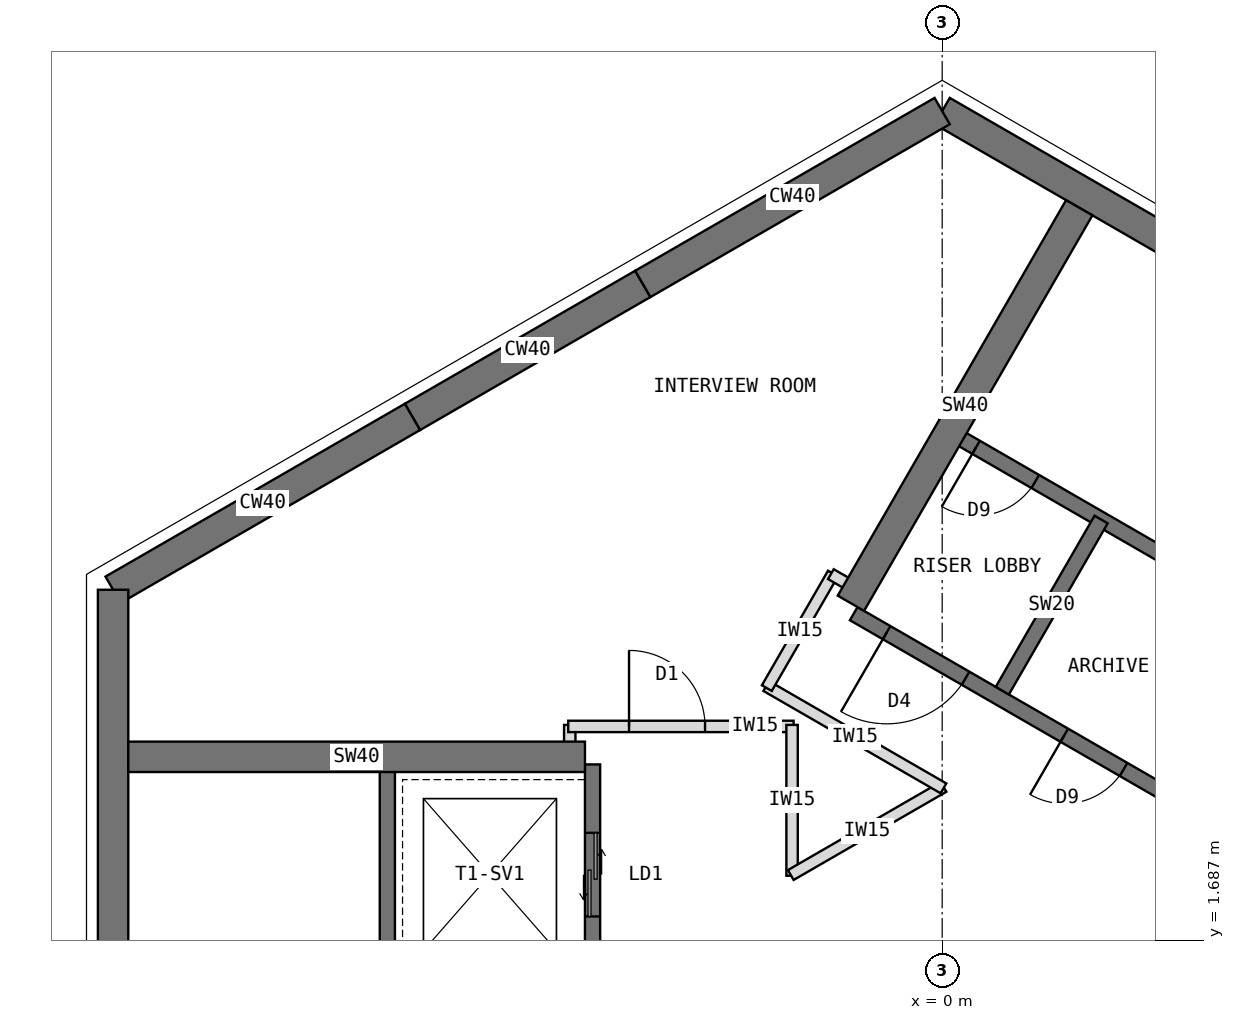
"""IFC4 building model, lengths in metres.
Left out: names, types, materials, properties, quantities, classifications, styles, units other than length and angle.
Written with IfcOpenShell. Run it as: python <this file> out.ifc"""

import sys

from ifc_helpers import new_model, si_unit, direction, frame, frame_2d, origin, place, context, subcontext, project, spatial, rectangle, extrude, element, fill, save


model = new_model("IFC4")
c1 = context("Model", 3, precision=1e-05, world=origin(), true_north=direction((0.0, 1.0)))
c2 = subcontext(c1, "Body", "Model", "MODEL_VIEW")
j1 = project(units=[si_unit("LENGTHUNIT", "METRE"), si_unit("PLANEANGLEUNIT", "RADIAN")], contexts=[c1])
p1 = place(None, origin())
s1 = spatial("IfcSite", under=j1, at=p1, CompositionType="ELEMENT")
p2 = place(p1, origin())
s2 = spatial("IfcBuilding", under=s1, at=p2, CompositionType="ELEMENT")
p3 = place(p2, frame((0.0, 0.0, 287.5)))
s3 = spatial("IfcBuildingStorey", under=s2, at=p3, CompositionType="ELEMENT", Elevation=287.5)
p4 = place(p3, frame((10.908, 6.298, 0.0), z_axis=(0.0, 0.0, 1.0), x_axis=(-0.866021940709, 0.500005998175, 0.0)))
e1 = element("IfcWall", 1, at=p4, inside=s3, PredefinedType="SHEAR", context=c2, shape_type="SweptSolid", body=[
    extrude(rectangle(XDim=12.596, YDim=0.4, at=frame_2d((6.298, 0.0))), origin(), (0.0, 0.0, 1.0), 4.0),
])
p5 = place(p3, frame((0.0, 12.596, 0.0), z_axis=(0.0, 0.0, 1.0), x_axis=(-0.866011268655, -0.500024481964, 0.0)))
e2 = element("IfcWall", 2, at=p5, inside=s3, PredefinedType="SHEAR", context=c2, shape_type="SweptSolid", body=[
    extrude(rectangle(XDim=4.548, YDim=0.4, at=frame_2d((2.274, 0.0))), origin(), (0.0, 0.0, 1.0), 4.0),
])
p6 = place(p3, frame((-3.939, 10.322, 0.0), z_axis=(0.0, 0.0, 1.0), x_axis=(-0.866019471182, -0.500010275428, 0.0)))
e3 = element("IfcWall", 3, at=p6, inside=s3, PredefinedType="SHEAR", context=c2, shape_type="SweptSolid", body=[
    extrude(rectangle(XDim=3.5, YDim=0.4, at=frame_2d((1.75, 0.0))), origin(), (0.0, 0.0, 1.0), 4.0),
])
p7 = place(p3, frame((-6.97, 8.572, 0.0), z_axis=(0.0, 0.0, 1.0), x_axis=(-0.866034513004, -0.499984222037, 0.0)))
e4 = element("IfcWall", 4, at=p7, inside=s3, PredefinedType="SHEAR", context=c2, shape_type="SweptSolid", body=[
    extrude(rectangle(XDim=4.548, YDim=0.4, at=frame_2d((2.274, 0.0))), origin(), (0.0, 0.0, 1.0), 4.0),
])
p8 = place(p3, frame((-10.908, 6.298, 0.0), z_axis=(0.0, 0.0, 1.0), x_axis=(0.0, -1.0, 0.0)))
e5 = element("IfcWall", 5, at=p8, inside=s3, PredefinedType="SHEAR", context=c2, shape_type="SweptSolid", body=[
    extrude(rectangle(XDim=12.596, YDim=0.4, at=frame_2d((6.298, 0.0))), origin(), (0.0, 0.0, 1.0), 4.0),
])
p9 = place(p3, frame((5.764, 1.984, 0.0), z_axis=(0.0, 0.0, 1.0), x_axis=(-0.866026010844, 0.49999894854, 0.0)))
e6 = element("IfcWall", 6, at=p9, inside=s3, PredefinedType="SHEAR", context=c2, shape_type="SweptSolid", body=[
    extrude(rectangle(XDim=8.0, YDim=0.2, at=frame_2d((4.0, 0.0))), origin(), (0.0, 0.0, 1.0), 4.0),
])
p10 = place(p9, frame((6.3, 0.0, 0.0)))
e7 = element("IfcOpeningElement", 7, at=p10, cuts=e6, PredefinedType="OPENING", context=c2, shape_type="SweptSolid", body=[
    extrude(rectangle(XDim=1.2, YDim=2.1, at=frame_2d((0.6, 1.05))), frame((0.0, 0.11, 0.0), z_axis=(0.0, -1.0, 0.0), x_axis=(1.0, 0.0, 0.0)), (0.0, 0.0, 1.0), 0.22),
])
p11 = place(p9, frame((1.0, 0.0, 0.0)))
e8 = element("IfcOpeningElement", 8, at=p11, cuts=e6, PredefinedType="OPENING", context=c2, shape_type="SweptSolid", body=[
    extrude(rectangle(XDim=0.9, YDim=2.1, at=frame_2d((0.45, 1.05))), frame((0.0, 0.11, 0.0), z_axis=(0.0, -1.0, 0.0), x_axis=(1.0, 0.0, 0.0)), (0.0, 0.0, 1.0), 0.22),
])
p12 = place(p9, frame((3.9, 0.0, 0.0)))
e9 = element("IfcOpeningElement", 9, at=p12, cuts=e6, PredefinedType="OPENING", context=c2, shape_type="SweptSolid", body=[
    extrude(rectangle(XDim=0.9, YDim=2.1, at=frame_2d((0.45, 1.05))), frame((0.0, 0.11, 0.0), z_axis=(0.0, -1.0, 0.0), x_axis=(1.0, 0.0, 0.0)), (0.0, 0.0, 1.0), 0.22),
])
p13 = place(p3, frame((0.791, 4.97, 0.0), z_axis=(0.0, 0.0, 1.0), x_axis=(0.499936506574, 0.866062058628, 0.0)))
e10 = element("IfcWall", 10, at=p13, inside=s3, PredefinedType="SHEAR", context=c2, shape_type="SweptSolid", body=[
    extrude(rectangle(XDim=2.6, YDim=0.2, at=frame_2d((1.3, 0.0))), origin(), (0.0, 0.0, 1.0), 4.0),
])
p14 = place(p3, frame((7.114, 4.322, 0.0), z_axis=(0.0, 0.0, 1.0), x_axis=(-0.866026010844, 0.49999894854, 0.0)))
e11 = element("IfcWall", 11, at=p14, inside=s3, PredefinedType="SHEAR", context=c2, shape_type="SweptSolid", body=[
    extrude(rectangle(XDim=8.0, YDim=0.2, at=frame_2d((4.0, 0.0))), origin(), (0.0, 0.0, 1.0), 4.0),
])
p15 = place(p14, frame((6.8, 0.0, 0.0)))
e12 = element("IfcOpeningElement", 12, at=p15, cuts=e11, PredefinedType="OPENING", context=c2, shape_type="SweptSolid", body=[
    extrude(rectangle(XDim=0.9, YDim=2.1, at=frame_2d((0.45, 1.05))), frame((0.0, 0.11, 0.0), z_axis=(0.0, -1.0, 0.0), x_axis=(1.0, 0.0, 0.0)), (0.0, 0.0, 1.0), 0.22),
])
p16 = place(p3, frame((-1.201, 6.12, 0.0), z_axis=(0.0, 0.0, 1.0), x_axis=(0.499997979876, 0.866026570101, 0.0)))
e13 = element("IfcWall", 13, at=p16, inside=s3, PredefinedType="SHEAR", context=c2, shape_type="SweptSolid", body=[
    extrude(rectangle(XDim=6.008, YDim=0.4, at=frame_2d((3.004, 0.0))), origin(), (0.0, 0.0, 1.0), 4.0),
])
p17 = place(p3, frame((-4.6, 4.0, 0.0), z_axis=(0.0, 0.0, 1.0), x_axis=(0.0, -1.0, 0.0)))
e14 = element("IfcWall", 14, at=p17, inside=s3, PredefinedType="SHEAR", context=c2, shape_type="SweptSolid", body=[
    extrude(rectangle(XDim=8.0, YDim=0.2, at=frame_2d((4.0, 0.0))), origin(), (0.0, 0.0, 1.0), 4.0),
])
p18 = place(p17, frame((6.3, 0.0, 0.0)))
e15 = element("IfcOpeningElement", 15, at=p18, cuts=e14, PredefinedType="OPENING", context=c2, shape_type="SweptSolid", body=[
    extrude(rectangle(XDim=1.2, YDim=2.1, at=frame_2d((0.6, 1.05))), frame((0.0, 0.11, 0.0), z_axis=(0.0, -1.0, 0.0), x_axis=(1.0, 0.0, 0.0)), (0.0, 0.0, 1.0), 0.22),
])
p19 = place(p17, frame((0.9, 0.0, 0.0)))
e16 = element("IfcOpeningElement", 16, at=p19, cuts=e14, PredefinedType="OPENING", context=c2, shape_type="SweptSolid", body=[
    extrude(rectangle(XDim=1.1, YDim=2.2, at=frame_2d((0.55, 1.1))), frame((0.0, 0.11, 0.0), z_axis=(0.0, -1.0, 0.0), x_axis=(1.0, 0.0, 0.0)), (0.0, 0.0, 1.0), 0.22),
])
p20 = place(p3, frame((-7.3, 4.0, 0.0), z_axis=(0.0, 0.0, 1.0), x_axis=(0.0, -1.0, 0.0)))
e17 = element("IfcWall", 17, at=p20, inside=s3, PredefinedType="SHEAR", context=c2, shape_type="SweptSolid", body=[
    extrude(rectangle(XDim=8.0, YDim=0.2, at=frame_2d((4.0, 0.0))), origin(), (0.0, 0.0, 1.0), 4.0),
])
p21 = place(p20, frame((6.7, 0.0, 0.0)))
e18 = element("IfcOpeningElement", 18, at=p21, cuts=e17, PredefinedType="OPENING", context=c2, shape_type="SweptSolid", body=[
    extrude(rectangle(XDim=1.1, YDim=2.1, at=frame_2d((0.55, 1.05))), frame((0.0, 0.11, 0.0), z_axis=(0.0, -1.0, 0.0), x_axis=(1.0, 0.0, 0.0)), (0.0, 0.0, 1.0), 0.22),
])
p22 = place(p3, frame((-4.7, 4.1, 0.0), z_axis=(0.0, 0.0, 1.0), x_axis=(-1.0, 0.0, 0.0)))
e19 = element("IfcWall", 19, at=p22, inside=s3, PredefinedType="SHEAR", context=c2, shape_type="SweptSolid", body=[
    extrude(rectangle(XDim=6.008, YDim=0.4, at=frame_2d((3.004, 0.0))), origin(), (0.0, 0.0, 1.0), 4.0),
])
p23 = place(p3, frame((-4.9, 4.09, 0.0), z_axis=(0.0, 0.0, 1.0), x_axis=(0.0, 1.0, 0.0)))
e20 = element("IfcWall", 20, at=p23, inside=s3, PredefinedType="PARTITIONING", context=c2, shape_type="SweptSolid", body=[
    extrude(rectangle(XDim=0.43, YDim=0.15, at=frame_2d((0.215, 0.0))), origin(), (0.0, 0.0, 1.0), 3.7),
])
p24 = place(p3, frame((-4.92, 4.5, 0.0), z_axis=(0.0, 0.0, 1.0), x_axis=(1.0, 0.0, 0.0)))
e21 = element("IfcWall", 21, at=p24, inside=s3, PredefinedType="PARTITIONING", context=c2, shape_type="SweptSolid", body=[
    extrude(rectangle(XDim=2.965, YDim=0.15, at=frame_2d((1.482, 0.0))), origin(), (0.0, 0.0, 1.0), 3.7),
])
p25 = place(p24, frame((0.8, 0.0, 0.0)))
e22 = element("IfcOpeningElement", 22, at=p25, cuts=e21, PredefinedType="OPENING", context=c2, shape_type="SweptSolid", body=[
    extrude(rectangle(XDim=1.0, YDim=2.1, at=frame_2d((0.5, 1.05))), frame((0.0, 0.085, 0.0), z_axis=(0.0, -1.0, 0.0), x_axis=(1.0, 0.0, 0.0)), (0.0, 0.0, 1.0), 0.17),
])
p26 = place(p3, frame((-1.975, 4.52, 0.0), z_axis=(0.0, 0.0, 1.0), x_axis=(0.0, -1.0, 0.0)))
e23 = element("IfcWall", 23, at=p26, inside=s3, PredefinedType="PARTITIONING", context=c2, shape_type="SweptSolid", body=[
    extrude(rectangle(XDim=1.985, YDim=0.15, at=frame_2d((0.993, 0.0))), origin(), (0.0, 0.0, 1.0), 3.7),
])
p27 = place(p3, frame((-1.992, 2.545, 0.0), z_axis=(0.0, 0.0, 1.0), x_axis=(0.866059450854, 0.499941024108, 0.0)))
e24 = element("IfcWall", 24, at=p27, inside=s3, PredefinedType="PARTITIONING", context=c2, shape_type="SweptSolid", body=[
    extrude(rectangle(XDim=2.321, YDim=0.15, at=frame_2d((1.16, 0.0))), origin(), (0.0, 0.0, 1.0), 3.7),
])
p28 = place(p3, frame((0.017, 3.685, 0.0), z_axis=(0.0, 0.0, 1.0), x_axis=(-0.866036099759, 0.499981473571, 0.0)))
e25 = element("IfcWall", 25, at=p28, inside=s3, PredefinedType="PARTITIONING", context=c2, shape_type="SweptSolid", body=[
    extrude(rectangle(XDim=2.692, YDim=0.15, at=frame_2d((1.346, 0.0))), origin(), (0.0, 0.0, 1.0), 3.7),
])
p29 = place(p3, frame((-2.307, 5.004, 0.0), z_axis=(0.0, 0.0, 1.0), x_axis=(0.500062521093, 0.865989304205, 0.0)))
e26 = element("IfcWall", 26, at=p29, inside=s3, PredefinedType="PARTITIONING", context=c2, shape_type="SweptSolid", body=[
    extrude(rectangle(XDim=1.74, YDim=0.15, at=frame_2d((0.87, 0.0))), origin(), (0.0, 0.0, 1.0), 3.7),
])
p30 = place(p3, frame((-1.464, 6.503, 0.0), z_axis=(0.0, 0.0, 1.0), x_axis=(0.866138304741, -0.499804398801, 0.0)))
e27 = element("IfcWall", 27, at=p30, inside=s3, PredefinedType="PARTITIONING", context=c2, shape_type="SweptSolid", body=[
    extrude(rectangle(XDim=0.43, YDim=0.15, at=frame_2d((0.215, 0.0))), origin(), (0.0, 0.0, 1.0), 3.7),
])
p31 = place(p10, origin())
e28 = element("IfcDoor", 28, at=p31, inside=s3, OperationType="SINGLE_SWING_RIGHT", PredefinedType="DOOR", context=c2, shape_type="SweptSolid", body=[
    extrude(rectangle(XDim=1.2, YDim=2.1, at=frame_2d((0.6, 1.05))), frame((0.0, 0.025, 0.0), z_axis=(0.0, -1.0, 0.0), x_axis=(1.0, 0.0, 0.0)), (0.0, 0.0, 1.0), 0.05),
])
fill(e7, e28)
p32 = place(p15, origin())
e29 = element("IfcDoor", 29, at=p32, inside=s3, OperationType="SINGLE_SWING_RIGHT", PredefinedType="DOOR", context=c2, shape_type="SweptSolid", body=[
    extrude(rectangle(XDim=0.9, YDim=2.1, at=frame_2d((0.45, 1.05))), frame((0.0, 0.025, 0.0), z_axis=(0.0, -1.0, 0.0), x_axis=(1.0, 0.0, 0.0)), (0.0, 0.0, 1.0), 0.05),
])
fill(e12, e29)
p33 = place(p19, origin())
e30 = element("IfcDoor", 30, at=p33, inside=s3, OperationType="DOUBLE_DOOR_SLIDING", PredefinedType="DOOR", context=c2, shape_type="SweptSolid", body=[
    extrude(rectangle(XDim=1.1, YDim=2.2, at=frame_2d((0.55, 1.1))), frame((0.0, 0.025, 0.0), z_axis=(0.0, -1.0, 0.0), x_axis=(1.0, 0.0, 0.0)), (0.0, 0.0, 1.0), 0.05),
])
fill(e16, e30)
p34 = place(p25, origin())
e31 = element("IfcDoor", 31, at=p34, inside=s3, OperationType="SINGLE_SWING_LEFT", PredefinedType="DOOR", context=c2, shape_type="SweptSolid", body=[
    extrude(rectangle(XDim=1.0, YDim=2.1, at=frame_2d((0.5, 1.05))), frame((0.0, 0.025, 0.0), z_axis=(0.0, -1.0, 0.0), x_axis=(1.0, 0.0, 0.0)), (0.0, 0.0, 1.0), 0.05),
])
fill(e22, e31)
p35 = place(p12, origin())
e32 = element("IfcDoor", 32, at=p35, inside=s3, OperationType="SINGLE_SWING_RIGHT", PredefinedType="DOOR", context=c2, shape_type="SweptSolid", body=[
    extrude(rectangle(XDim=0.9, YDim=2.1, at=frame_2d((0.45, 1.05))), frame((0.0, 0.025, 0.0), z_axis=(0.0, -1.0, 0.0), x_axis=(1.0, 0.0, 0.0)), (0.0, 0.0, 1.0), 0.05),
])
fill(e9, e32)
save(model, sys.argv[1])
